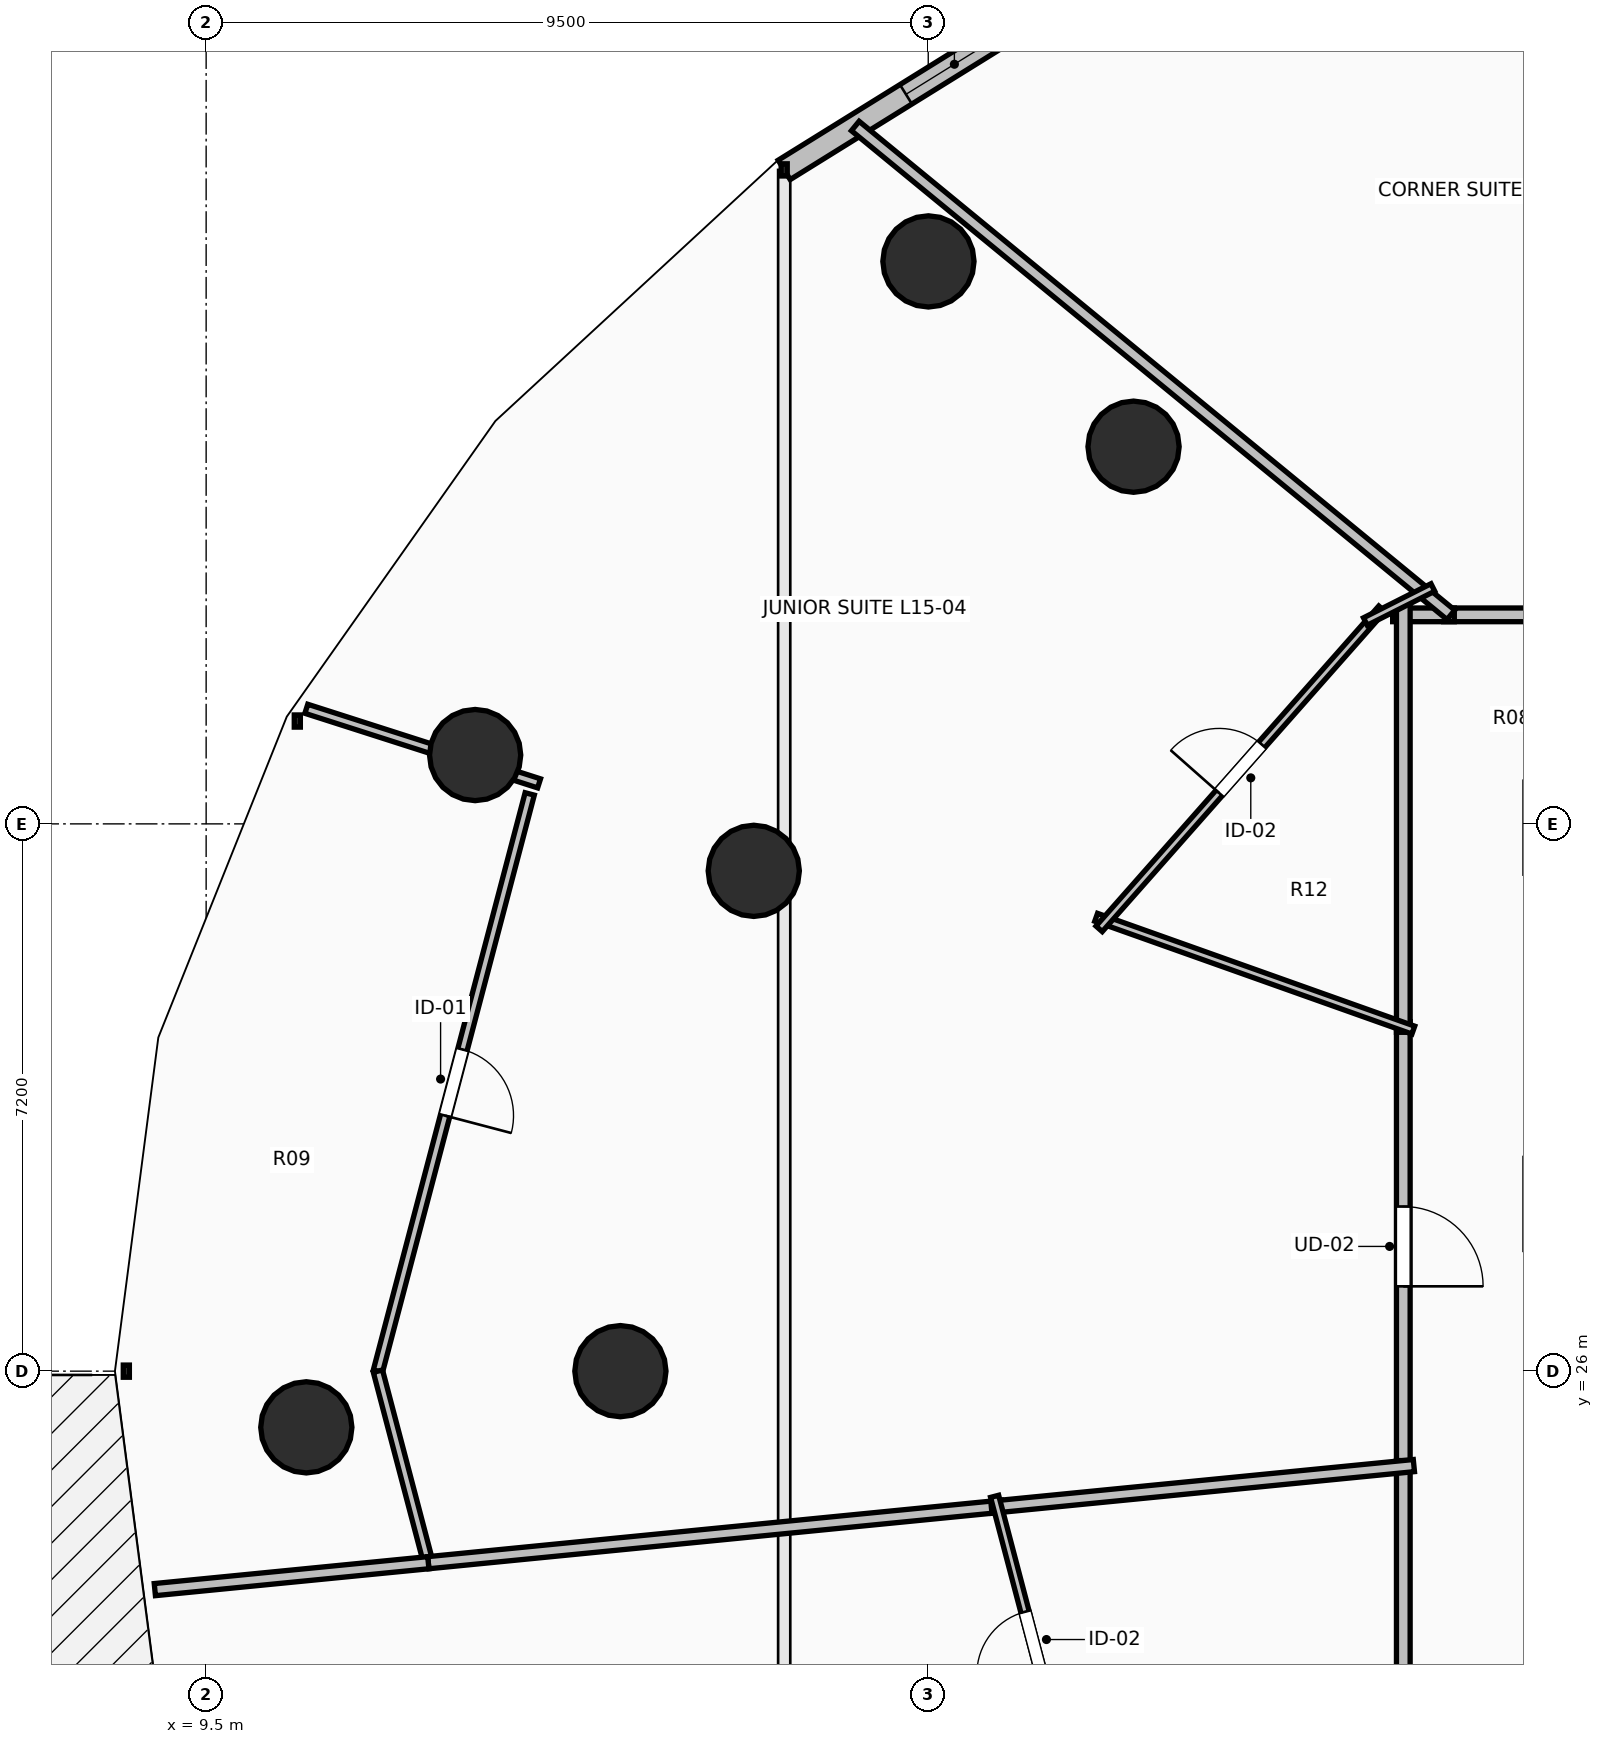
"""IFC4 building model, lengths in metres.
Left out: names, types, materials, properties, quantities, classifications, styles, units other than length and angle.
Written with IfcOpenShell. Run it as: python <this file> out.ifc"""

import sys

from ifc_helpers import new_model, si_unit, direction, frame, frame_2d, origin, origin_2d, place, context, subcontext, project, spatial, rectangle, circle, extrude, element, fill, save


model = new_model("IFC4")
c1 = context("Model", 3, precision=1e-05, world=origin(), true_north=direction((0.0, 1.0)))
c2 = subcontext(c1, "Body", "Model", "MODEL_VIEW")
j1 = project(units=[si_unit("LENGTHUNIT", "METRE"), si_unit("PLANEANGLEUNIT", "RADIAN")], contexts=[c1])
p1 = place(None, origin())
s1 = spatial("IfcSite", under=j1, at=p1, CompositionType="ELEMENT")
p2 = place(p1, origin())
s2 = spatial("IfcBuilding", under=s1, at=p2, CompositionType="ELEMENT")
p3 = place(p2, frame((0.0, 0.0, 59.0)))
s3 = spatial("IfcBuildingStorey", under=s2, at=p3, CompositionType="ELEMENT", Elevation=59.0)
for number, where, z_axis, x_axis in (
    (1, (21.701, 38.162, 0.0), (0.0, 0.0, 1.0), (-0.707, 0.707, 0.0)),
    (2, (16.705, 32.582, 0.0), (0.0, 0.0, 1.0), (-0.924, 0.383, 0.0)),
    (3, (14.95, 26.0, 0.0), (0.0, 0.0, 1.0), (-1.0, 0.0, 0.0)),
    (4, (19.003, 40.6, 0.0), (0.0, 0.0, 1.0), (-0.707, 0.707, 0.0)),
    (5, (13.039, 34.105, 0.0), (0.0, 0.0, 1.0), (-0.924, 0.383, 0.0)),
    (6, (10.818, 25.261, 0.0), (0.0, 0.0, 1.0), (-1.0, 0.0, 0.0)),
):
    element("IfcColumn", number, at=place(p3, frame(where, z_axis=z_axis, x_axis=x_axis)), inside=s3, PredefinedType="COLUMN", context=c2, shape_type="SweptSolid", body=[
        extrude(circle(Radius=0.6, at=origin_2d()), origin(), (0.0, 0.0, 1.0), 3.5),
    ])
p4 = place(p3, frame((21.583, 44.583, 0.0), z_axis=(0.0, 0.0, 1.0), x_axis=(-0.849633724826, -0.527373239404, 0.0)))
e7 = element("IfcWall", 7, at=p4, inside=s3, PredefinedType="STANDARD", context=c2, shape_type="SweptSolid", body=[
    extrude(rectangle(XDim=5.271, YDim=0.3, at=frame_2d((2.635, 0.0))), origin(), (0.0, 0.0, 1.0), 3.24),
])
p5 = place(p4, frame((1.885, 0.0, 0.85)))
e8 = element("IfcOpeningElement", 8, at=p5, cuts=e7, PredefinedType="OPENING", context=c2, shape_type="SweptSolid", body=[
    extrude(rectangle(XDim=1.5, YDim=2.19, at=frame_2d((0.75, 1.095))), frame((0.0, 0.165, 0.0), z_axis=(0.0, -1.0, 0.0), x_axis=(1.0, 0.0, 0.0)), (0.0, 0.0, 1.0), 0.33),
])
p6 = place(p3, frame((33.33, 35.95, 0.0), z_axis=(0.0, 0.0, 1.0), x_axis=(-1.0, 0.0, 0.0)))
e9 = element("IfcWall", 9, at=p6, inside=s3, PredefinedType="PARTITIONING", context=c2, shape_type="SweptSolid", body=[
    extrude(rectangle(XDim=7.549, YDim=0.18, at=frame_2d((3.774, 0.0))), origin(), (0.0, 0.0, 1.0), 2.432),
])
p7 = place(p6, frame((3.25, 0.0, 0.0)))
e10 = element("IfcOpeningElement", 10, at=p7, cuts=e9, PredefinedType="OPENING", context=c2, shape_type="SweptSolid", body=[
    extrude(rectangle(XDim=1.05, YDim=2.2, at=frame_2d((0.525, 1.1))), frame((0.0, 0.105, 0.0), z_axis=(0.0, -1.0, 0.0), x_axis=(1.0, 0.0, 0.0)), (0.0, 0.0, 1.0), 0.21),
])
p8 = place(p3, frame((25.25, 30.598, 0.0), z_axis=(0.0, 0.0, 1.0), x_axis=(0.0, -1.0, 0.0)))
e11 = element("IfcWall", 11, at=p8, inside=s3, PredefinedType="PARTITIONING", context=c2, shape_type="SweptSolid", body=[
    extrude(rectangle(XDim=5.914, YDim=0.18, at=frame_2d((2.957, 0.0))), origin(), (0.0, 0.0, 1.0), 2.432),
])
p9 = place(p8, frame((2.432, 0.0, 0.0)))
e12 = element("IfcOpeningElement", 12, at=p9, cuts=e11, PredefinedType="OPENING", context=c2, shape_type="SweptSolid", body=[
    extrude(rectangle(XDim=1.05, YDim=2.2, at=frame_2d((0.525, 1.1))), frame((0.0, 0.105, 0.0), z_axis=(0.0, -1.0, 0.0), x_axis=(1.0, 0.0, 0.0)), (0.0, 0.0, 1.0), 0.21),
])
p10 = place(p3, frame((25.921, 35.95, 0.0), z_axis=(0.0, 0.0, 1.0), x_axis=(-1.0, 0.0, 0.0)))
e13 = element("IfcWall", 13, at=p10, inside=s3, PredefinedType="PARTITIONING", context=c2, shape_type="SweptSolid", body=[
    extrude(rectangle(XDim=0.811, YDim=0.18, at=frame_2d((0.405, 0.0))), origin(), (0.0, 0.0, 1.0), 2.929),
])
p11 = place(p3, frame((25.25, 36.09, 0.0), z_axis=(0.0, 0.0, 1.0), x_axis=(0.0, -1.0, 0.0)))
e14 = element("IfcWall", 14, at=p11, inside=s3, PredefinedType="PARTITIONING", context=c2, shape_type="SweptSolid", body=[
    extrude(rectangle(XDim=5.632, YDim=0.18, at=frame_2d((2.816, 0.0))), origin(), (0.0, 0.0, 1.0), 2.432),
])
p12 = place(p3, frame((25.25, 24.824, 0.0), z_axis=(0.0, 0.0, 1.0), x_axis=(0.0, -1.0, 0.0)))
e15 = element("IfcWall", 15, at=p12, inside=s3, PredefinedType="PARTITIONING", context=c2, shape_type="SweptSolid", body=[
    extrude(rectangle(XDim=4.965, YDim=0.18, at=frame_2d((2.482, 0.0))), origin(), (0.0, 0.0, 1.0), 3.24),
])
p13 = place(p3, frame((18.04, 42.381, 0.0), z_axis=(0.0, 0.0, 1.0), x_axis=(0.772992813725, -0.634414777515, 0.0)))
e16 = element("IfcWall", 16, at=p13, inside=s3, PredefinedType="PARTITIONING", context=c2, shape_type="SweptSolid", body=[
    extrude(rectangle(XDim=10.137, YDim=0.16, at=frame_2d((5.069, 0.0))), origin(), (0.0, 0.0, 1.0), 2.624),
])
p14 = place(p3, frame((25.382, 30.487, 0.0), z_axis=(0.0, 0.0, 1.0), x_axis=(-0.942199995763, 0.335050993111, 0.0)))
e17 = element("IfcWall", 17, at=p14, inside=s3, PredefinedType="PARTITIONING", context=c2, shape_type="SweptSolid", body=[
    extrude(rectangle(XDim=4.429, YDim=0.11, at=frame_2d((2.214, 0.0))), origin(), (0.0, 0.0, 1.0), 2.929),
])
p15 = place(p3, frame((21.248, 31.819, 0.0), z_axis=(0.0, 0.0, 1.0), x_axis=(0.662135950736, 0.749383735307, 0.0)))
e18 = element("IfcWall", 18, at=p15, inside=s3, PredefinedType="PARTITIONING", context=c2, shape_type="SweptSolid", body=[
    extrude(rectangle(XDim=5.619, YDim=0.11, at=frame_2d((2.81, 0.0))), origin(), (0.0, 0.0, 1.0), 2.432),
])
p16 = place(p15, frame((2.385, 0.0, 0.0)))
e19 = element("IfcOpeningElement", 19, at=p16, cuts=e18, PredefinedType="OPENING", context=c2, shape_type="SweptSolid", body=[
    extrude(rectangle(XDim=0.85, YDim=2.1, at=frame_2d((0.425, 1.05))), frame((0.0, 0.07, 0.0), z_axis=(0.0, -1.0, 0.0), x_axis=(1.0, 0.0, 0.0)), (0.0, 0.0, 1.0), 0.14),
])
p17 = place(p3, frame((24.751, 35.862, 0.0), z_axis=(0.0, 0.0, 1.0), x_axis=(0.892702438486, 0.450646598037, 0.0)))
e20 = element("IfcWall", 20, at=p17, inside=s3, PredefinedType="PARTITIONING", context=c2, shape_type="SweptSolid", body=[
    extrude(rectangle(XDim=0.995, YDim=0.11, at=frame_2d((0.497, 0.0))), origin(), (0.0, 0.0, 1.0), 3.24),
])
p18 = place(p3, frame((13.757, 33.594, 0.0), z_axis=(0.0, 0.0, 1.0), x_axis=(-0.254332600041, -0.96711681226, 0.0)))
e21 = element("IfcWall", 21, at=p18, inside=s3, PredefinedType="PARTITIONING", context=c2, shape_type="SweptSolid", body=[
    extrude(rectangle(XDim=7.852, YDim=0.125, at=frame_2d((3.926, 0.0))), origin(), (0.0, 0.0, 1.0), 2.432),
])
p19 = place(p18, frame((3.476, 0.0, 0.0)))
e22 = element("IfcOpeningElement", 22, at=p19, cuts=e21, PredefinedType="OPENING", context=c2, shape_type="SweptSolid", body=[
    extrude(rectangle(XDim=0.9, YDim=2.1, at=frame_2d((0.45, 1.05))), frame((0.0, 0.077, 0.0), z_axis=(0.0, -1.0, 0.0), x_axis=(1.0, 0.0, 0.0)), (0.0, 0.0, 1.0), 0.155),
])
p20 = place(p3, frame((11.76, 26.0, 0.0), z_axis=(0.0, 0.0, 1.0), x_axis=(0.254465628682, -0.967081818576, 0.0)))
e23 = element("IfcWall", 23, at=p20, inside=s3, PredefinedType="PARTITIONING", context=c2, shape_type="SweptSolid", body=[
    extrude(rectangle(XDim=2.606, YDim=0.125, at=frame_2d((1.303, 0.0))), origin(), (0.0, 0.0, 1.0), 2.432),
])
p21 = place(p3, frame((10.818, 34.714, 0.0), z_axis=(0.0, 0.0, 1.0), x_axis=(0.952294454461, -0.305180720236, 0.0)))
e24 = element("IfcWall", 24, at=p21, inside=s3, PredefinedType="PARTITIONING", context=c2, shape_type="SweptSolid", body=[
    extrude(rectangle(XDim=3.215, YDim=0.125, at=frame_2d((1.607, 0.0))), origin(), (0.0, 0.0, 1.0), 2.432),
])
p22 = place(p3, frame((12.423, 23.48, 0.0), z_axis=(0.0, 0.0, 1.0), x_axis=(0.995173937517, 0.098126622721, 0.0)))
e25 = element("IfcWall", 25, at=p22, inside=s3, PredefinedType="PARTITIONING", context=c2, shape_type="SweptSolid", body=[
    extrude(rectangle(XDim=7.583, YDim=0.16, at=frame_2d((3.792, 0.0))), origin(), (0.0, 0.0, 1.0), 2.886),
])
p23 = place(p3, frame((19.831, 24.21, 0.0), z_axis=(0.0, 0.0, 1.0), x_axis=(0.995182391057, 0.098040851333, 0.0)))
e26 = element("IfcWall", 26, at=p23, inside=s3, PredefinedType="PARTITIONING", context=c2, shape_type="SweptSolid", body=[
    extrude(rectangle(XDim=5.585, YDim=0.16, at=frame_2d((2.793, 0.0))), origin(), (0.0, 0.0, 1.0), 2.929),
])
p24 = place(p3, frame((8.825, 23.126, 0.0), z_axis=(0.0, 0.0, 1.0), x_axis=(0.995195038103, 0.097912390097, 0.0)))
e27 = element("IfcWall", 27, at=p24, inside=s3, PredefinedType="PARTITIONING", context=c2, shape_type="SweptSolid", body=[
    extrude(rectangle(XDim=3.615, YDim=0.16, at=frame_2d((1.808, 0.0))), origin(), (0.0, 0.0, 1.0), 2.624),
])
p25 = place(p3, frame((20.889, 20.494, 0.0), z_axis=(0.0, 0.0, 1.0), x_axis=(-0.254405980461, 0.967097511684, 0.0)))
e28 = element("IfcWall", 28, at=p25, inside=s3, PredefinedType="PARTITIONING", context=c2, shape_type="SweptSolid", body=[
    extrude(rectangle(XDim=3.991, YDim=0.11, at=frame_2d((1.996, 0.0))), origin(), (0.0, 0.0, 1.0), 3.24),
])
p26 = place(p25, frame((1.571, 0.0, 0.0)))
e29 = element("IfcOpeningElement", 29, at=p26, cuts=e28, PredefinedType="OPENING", context=c2, shape_type="SweptSolid", body=[
    extrude(rectangle(XDim=0.85, YDim=2.1, at=frame_2d((0.425, 1.05))), frame((0.0, 0.07, 0.0), z_axis=(0.0, -1.0, 0.0), x_axis=(1.0, 0.0, 0.0)), (0.0, 0.0, 1.0), 0.14),
])
p27 = place(p5, origin())
e30 = element("IfcWindow", 30, at=p27, inside=s3, PartitioningType="SINGLE_PANEL", PredefinedType="WINDOW", context=c2, shape_type="SweptSolid", body=[
    extrude(rectangle(XDim=1.5, YDim=2.19, at=frame_2d((0.75, 1.095))), frame((0.0, 0.03, 0.0), z_axis=(0.0, -1.0, 0.0), x_axis=(1.0, 0.0, 0.0)), (0.0, 0.0, 1.0), 0.06),
])
fill(e8, e30)
p28 = place(p9, origin())
e31 = element("IfcDoor", 31, at=p28, inside=s3, OperationType="SINGLE_SWING_RIGHT", PredefinedType="DOOR", context=c2, shape_type="SweptSolid", body=[
    extrude(rectangle(XDim=1.05, YDim=2.2, at=frame_2d((0.525, 1.1))), frame((0.0, 0.025, 0.0), z_axis=(0.0, -1.0, 0.0), x_axis=(1.0, 0.0, 0.0)), (0.0, 0.0, 1.0), 0.05),
])
fill(e12, e31)
p29 = place(p16, origin())
e32 = element("IfcDoor", 32, at=p29, inside=s3, OperationType="SINGLE_SWING_LEFT", PredefinedType="DOOR", context=c2, shape_type="SweptSolid", body=[
    extrude(rectangle(XDim=0.85, YDim=2.1, at=frame_2d((0.425, 1.05))), frame((0.0, 0.025, 0.0), z_axis=(0.0, -1.0, 0.0), x_axis=(1.0, 0.0, 0.0)), (0.0, 0.0, 1.0), 0.05),
])
fill(e19, e32)
p30 = place(p19, origin())
e33 = element("IfcDoor", 33, at=p30, inside=s3, OperationType="SINGLE_SWING_RIGHT", PredefinedType="DOOR", context=c2, shape_type="SweptSolid", body=[
    extrude(rectangle(XDim=0.9, YDim=2.1, at=frame_2d((0.45, 1.05))), frame((0.0, 0.025, 0.0), z_axis=(0.0, -1.0, 0.0), x_axis=(1.0, 0.0, 0.0)), (0.0, 0.0, 1.0), 0.05),
])
fill(e22, e33)
p31 = place(p26, origin())
e34 = element("IfcDoor", 34, at=p31, inside=s3, OperationType="SINGLE_SWING_LEFT", PredefinedType="DOOR", context=c2, shape_type="SweptSolid", body=[
    extrude(rectangle(XDim=0.85, YDim=2.1, at=frame_2d((0.425, 1.05))), frame((0.0, 0.025, 0.0), z_axis=(0.0, -1.0, 0.0), x_axis=(1.0, 0.0, 0.0)), (0.0, 0.0, 1.0), 0.05),
])
fill(e29, e34)
save(model, sys.argv[1])
